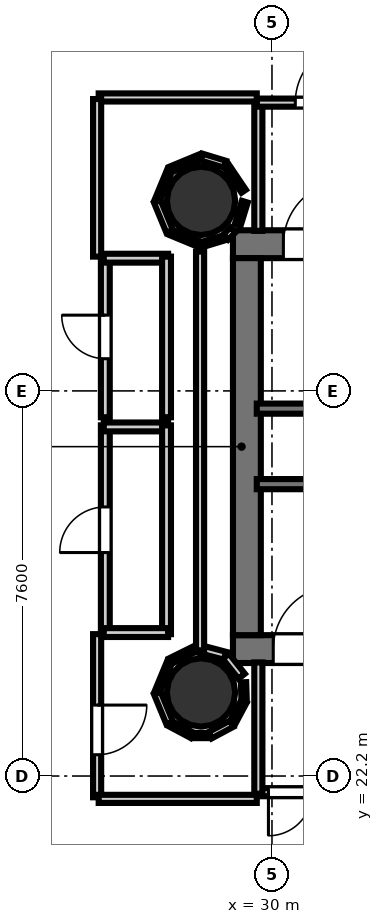
"""IFC4 building model, lengths in metres.
Left out: names, types, materials, properties, quantities, classifications, styles, units other than length and angle.
Written with IfcOpenShell. Run it as: python <this file> out.ifc"""

import sys

from ifc_helpers import new_model, si_unit, direction, frame, frame_2d, origin, origin_2d, place, context, subcontext, project, spatial, rectangle, hollow_circle, extrude, element, fill, save


model = new_model("IFC4")
c1 = context("Model", 3, precision=1e-05, world=origin(), true_north=direction((0.0, 1.0)))
c2 = subcontext(c1, "Body", "Model", "MODEL_VIEW")
j1 = project(units=[si_unit("LENGTHUNIT", "METRE"), si_unit("PLANEANGLEUNIT", "RADIAN")], contexts=[c1])
p1 = place(None, origin())
s1 = spatial("IfcSite", under=j1, at=p1, CompositionType="ELEMENT")
p2 = place(p1, origin())
s2 = spatial("IfcBuilding", under=s1, at=p2, CompositionType="ELEMENT")
p3 = place(p2, frame((0.0, 0.0, 151.3)))
s3 = spatial("IfcBuildingStorey", under=s2, at=p3, CompositionType="ELEMENT", Elevation=151.3)
p4 = place(p3, frame((29.23, 32.695, 0.0), z_axis=(0.0, 0.0, 1.0), x_axis=(1.0, 0.0, 0.0)))
e1 = element("IfcWall", 1, at=p4, inside=s3, PredefinedType="SHEAR", context=c2, shape_type="SweptSolid", body=[
    extrude(rectangle(XDim=10.62, YDim=0.55, at=frame_2d((5.31, 0.0))), origin(), (0.0, 0.0, 1.0), 3.52),
])
p5 = place(p4, frame((0.995, 0.0, 0.0)))
e2 = element("IfcOpeningElement", 2, at=p5, cuts=e1, PredefinedType="OPENING", context=c2, shape_type="SweptSolid", body=[
    extrude(rectangle(XDim=1.25, YDim=2.15, at=frame_2d((0.625, 1.075))), frame((0.0, 0.285, 0.0), z_axis=(0.0, -1.0, 0.0), x_axis=(1.0, 0.0, 0.0)), (0.0, 0.0, 1.0), 0.57),
])
p6 = place(p3, frame((29.23, 24.705, 0.0), z_axis=(0.0, 0.0, 1.0), x_axis=(1.0, 0.0, 0.0)))
e3 = element("IfcWall", 3, at=p6, inside=s3, PredefinedType="SHEAR", context=c2, shape_type="SweptSolid", body=[
    extrude(rectangle(XDim=10.62, YDim=0.55, at=frame_2d((5.31, 0.0))), origin(), (0.0, 0.0, 1.0), 3.52),
])
p7 = place(p6, frame((0.795, 0.0, 0.0)))
e4 = element("IfcOpeningElement", 4, at=p7, cuts=e3, PredefinedType="OPENING", context=c2, shape_type="SweptSolid", body=[
    extrude(rectangle(XDim=1.25, YDim=2.15, at=frame_2d((0.625, 1.075))), frame((0.0, 0.285, 0.0), z_axis=(0.0, -1.0, 0.0), x_axis=(1.0, 0.0, 0.0)), (0.0, 0.0, 1.0), 0.57),
])
p8 = place(p3, frame((29.505, 24.98, 0.0), z_axis=(0.0, 0.0, 1.0), x_axis=(0.0, 1.0, 0.0)))
e5 = element("IfcWall", 5, at=p8, inside=s3, PredefinedType="SHEAR", context=c2, shape_type="SweptSolid", body=[
    extrude(rectangle(XDim=7.44, YDim=0.55, at=frame_2d((3.72, 0.0))), origin(), (0.0, 0.0, 1.0), 3.52),
])
for number, where, z_axis, x_axis in (
    (6, (28.6, 33.55, 0.0), (0.0, 0.0, 1.0), (1.0, 0.0, 0.0)),
    (7, (28.6, 23.85, 0.0), (0.0, 0.0, 1.0), (1.0, 0.0, 0.0)),
):
    element("IfcColumn", number, at=place(p3, frame(where, z_axis=z_axis, x_axis=x_axis)), inside=s3, PredefinedType="COLUMN", context=c2, shape_type="SweptSolid", body=[
        extrude(hollow_circle(Radius=0.675, WallThickness=0.032, at=origin_2d()), origin(), (0.0, 0.0, 1.0), 3.7),
    ])
p9 = place(p3, frame((29.7, 29.45, 0.0), z_axis=(0.0, 0.0, 1.0), x_axis=(1.0, 0.0, 0.0)))
e8 = element("IfcWall", 8, at=p9, inside=s3, PredefinedType="SOLIDWALL", context=c2, shape_type="SweptSolid", body=[
    extrude(rectangle(XDim=8.3, YDim=0.2, at=frame_2d((4.15, 0.0))), origin(), (0.0, 0.0, 1.0), 3.52),
])
p10 = place(p3, frame((29.7, 27.96, 0.0), z_axis=(0.0, 0.0, 1.0), x_axis=(1.0, 0.0, 0.0)))
e9 = element("IfcWall", 9, at=p10, inside=s3, PredefinedType="SOLIDWALL", context=c2, shape_type="SweptSolid", body=[
    extrude(rectangle(XDim=7.75, YDim=0.2, at=frame_2d((3.875, 0.0))), origin(), (0.0, 0.0, 1.0), 3.52),
])
p11 = place(p3, frame((29.731, 32.958, 0.0), z_axis=(0.0, 0.0, 1.0), x_axis=(0.0, 1.0, 0.0)))
e10 = element("IfcWall", 10, at=p11, inside=s3, PredefinedType="PARTITIONING", context=c2, shape_type="SweptSolid", body=[
    extrude(rectangle(XDim=2.562, YDim=0.16, at=frame_2d((1.281, 0.0))), origin(), (0.0, 0.0, 1.0), 2.84),
])
p12 = place(p3, frame((29.7, 35.489, 0.0), z_axis=(0.0, 0.0, 1.0), x_axis=(1.0, 0.0, 0.0)))
e11 = element("IfcWall", 11, at=p12, inside=s3, PredefinedType="PARTITIONING", context=c2, shape_type="SweptSolid", body=[
    extrude(rectangle(XDim=2.72, YDim=0.16, at=frame_2d((1.36, 0.0))), origin(), (0.0, 0.0, 1.0), 2.84),
])
p13 = place(p12, frame((0.76, 0.0, 0.0)))
e12 = element("IfcOpeningElement", 12, at=p13, cuts=e11, PredefinedType="OPENING", context=c2, shape_type="SweptSolid", body=[
    extrude(rectangle(XDim=1.2, YDim=2.15, at=frame_2d((0.6, 1.075))), frame((0.0, 0.09, 0.0), z_axis=(0.0, -1.0, 0.0), x_axis=(1.0, 0.0, 0.0)), (0.0, 0.0, 1.0), 0.18),
])
p14 = place(p3, frame((33.45, 21.881, 0.0), z_axis=(0.0, 0.0, 1.0), x_axis=(-1.0, 0.0, 0.0)))
e13 = element("IfcWall", 13, at=p14, inside=s3, PredefinedType="PARTITIONING", context=c2, shape_type="SweptSolid", body=[
    extrude(rectangle(XDim=3.75, YDim=0.16, at=frame_2d((1.875, 0.0))), origin(), (0.0, 0.0, 1.0), 2.84),
])
p15 = place(p14, frame((1.275, 0.0, 0.0)))
e14 = element("IfcOpeningElement", 14, at=p15, cuts=e13, PredefinedType="OPENING", context=c2, shape_type="SweptSolid", body=[
    extrude(rectangle(XDim=1.2, YDim=2.15, at=frame_2d((0.6, 1.075))), frame((0.0, 0.09, 0.0), z_axis=(0.0, -1.0, 0.0), x_axis=(1.0, 0.0, 0.0)), (0.0, 0.0, 1.0), 0.18),
])
p16 = place(p14, frame((2.66, 0.0, 0.0)))
e15 = element("IfcOpeningElement", 15, at=p16, cuts=e13, PredefinedType="OPENING", context=c2, shape_type="SweptSolid", body=[
    extrude(rectangle(XDim=0.86, YDim=2.05, at=frame_2d((0.43, 1.025))), frame((0.0, 0.09, 0.0), z_axis=(0.0, -1.0, 0.0), x_axis=(1.0, 0.0, 0.0)), (0.0, 0.0, 1.0), 0.18),
])
p17 = place(p3, frame((29.731, 21.85, 0.0), z_axis=(0.0, 0.0, 1.0), x_axis=(0.0, 1.0, 0.0)))
e16 = element("IfcWall", 16, at=p17, inside=s3, PredefinedType="PARTITIONING", context=c2, shape_type="SweptSolid", body=[
    extrude(rectangle(XDim=2.592, YDim=0.16, at=frame_2d((1.296, 0.0))), origin(), (0.0, 0.0, 1.0), 2.84),
])
p18 = place(p3, frame((26.711, 25.0, 0.0), z_axis=(0.0, 0.0, 1.0), x_axis=(0.0, 1.0, 0.0)))
e17 = element("IfcWall", 17, at=p18, inside=s3, PredefinedType="PLUMBINGWALL", context=c2, shape_type="SweptSolid", body=[
    extrude(rectangle(XDim=4.12, YDim=0.175, at=frame_2d((2.06, 0.0))), origin(), (0.0, 0.0, 1.0), 2.84),
])
p19 = place(p18, frame((1.61, 0.0, 0.0)))
e18 = element("IfcOpeningElement", 18, at=p19, cuts=e17, PredefinedType="OPENING", context=c2, shape_type="SweptSolid", body=[
    extrude(rectangle(XDim=0.9, YDim=2.1, at=frame_2d((0.45, 1.05))), frame((0.0, 0.097, 0.0), z_axis=(0.0, -1.0, 0.0), x_axis=(1.0, 0.0, 0.0)), (0.0, 0.0, 1.0), 0.195),
])
p20 = place(p3, frame((26.68, 29.089, 0.0), z_axis=(0.0, 0.0, 1.0), x_axis=(1.0, 0.0, 0.0)))
e19 = element("IfcWall", 19, at=p20, inside=s3, PredefinedType="PLUMBINGWALL", context=c2, shape_type="SweptSolid", body=[
    extrude(rectangle(XDim=1.27, YDim=0.175, at=frame_2d((0.635, 0.0))), origin(), (0.0, 0.0, 1.0), 2.84),
])
p21 = place(p3, frame((27.919, 29.12, 0.0), z_axis=(0.0, 0.0, 1.0), x_axis=(0.0, -1.0, 0.0)))
e20 = element("IfcWall", 20, at=p21, inside=s3, PredefinedType="PLUMBINGWALL", context=c2, shape_type="SweptSolid", body=[
    extrude(rectangle(XDim=4.12, YDim=0.175, at=frame_2d((2.06, 0.0))), origin(), (0.0, 0.0, 1.0), 2.84),
])
p22 = place(p3, frame((27.95, 25.031, 0.0), z_axis=(0.0, 0.0, 1.0), x_axis=(-1.0, 0.0, 0.0)))
e21 = element("IfcWall", 21, at=p22, inside=s3, PredefinedType="PLUMBINGWALL", context=c2, shape_type="SweptSolid", body=[
    extrude(rectangle(XDim=1.27, YDim=0.175, at=frame_2d((0.635, 0.0))), origin(), (0.0, 0.0, 1.0), 2.84),
])
p23 = place(p3, frame((26.711, 29.28, 0.0), z_axis=(0.0, 0.0, 1.0), x_axis=(0.0, 1.0, 0.0)))
e22 = element("IfcWall", 22, at=p23, inside=s3, PredefinedType="PLUMBINGWALL", context=c2, shape_type="SweptSolid", body=[
    extrude(rectangle(XDim=3.17, YDim=0.175, at=frame_2d((1.585, 0.0))), origin(), (0.0, 0.0, 1.0), 2.84),
])
p24 = place(p23, frame((1.155, 0.0, 0.0)))
e23 = element("IfcOpeningElement", 23, at=p24, cuts=e22, PredefinedType="OPENING", context=c2, shape_type="SweptSolid", body=[
    extrude(rectangle(XDim=0.86, YDim=2.05, at=frame_2d((0.43, 1.025))), frame((0.0, 0.097, 0.0), z_axis=(0.0, -1.0, 0.0), x_axis=(1.0, 0.0, 0.0)), (0.0, 0.0, 1.0), 0.195),
])
p25 = place(p3, frame((26.68, 32.419, 0.0), z_axis=(0.0, 0.0, 1.0), x_axis=(1.0, 0.0, 0.0)))
e24 = element("IfcWall", 24, at=p25, inside=s3, PredefinedType="PLUMBINGWALL", context=c2, shape_type="SweptSolid", body=[
    extrude(rectangle(XDim=1.27, YDim=0.175, at=frame_2d((0.635, 0.0))), origin(), (0.0, 0.0, 1.0), 2.84),
])
p26 = place(p3, frame((27.919, 32.45, 0.0), z_axis=(0.0, 0.0, 1.0), x_axis=(0.0, -1.0, 0.0)))
e25 = element("IfcWall", 25, at=p26, inside=s3, PredefinedType="PLUMBINGWALL", context=c2, shape_type="SweptSolid", body=[
    extrude(rectangle(XDim=3.17, YDim=0.175, at=frame_2d((1.585, 0.0))), origin(), (0.0, 0.0, 1.0), 2.84),
])
p27 = place(p3, frame((29.402, 24.169, 0.0), z_axis=(0.0, 0.0, 1.0), x_axis=(-0.622091855036, 0.782944266151, 0.0)))
e26 = element("IfcWall", 26, at=p27, inside=s3, PredefinedType="PARTITIONING", context=c2, shape_type="SweptSolid", body=[
    extrude(rectangle(XDim=0.504, YDim=0.16, at=frame_2d((0.252, 0.0))), origin(), (0.0, 0.0, 1.0), 2.84),
])
p28 = place(p3, frame((29.072, 24.574, 0.0), z_axis=(0.0, 0.0, 1.0), x_axis=(-0.966842101769, 0.255374920942, 0.0)))
e27 = element("IfcWall", 27, at=p28, inside=s3, PredefinedType="PARTITIONING", context=c2, shape_type="SweptSolid", body=[
    extrude(rectangle(XDim=0.531, YDim=0.16, at=frame_2d((0.266, 0.0))), origin(), (0.0, 0.0, 1.0), 2.84),
])
p29 = place(p3, frame((28.581, 24.68, 0.0), z_axis=(0.0, 0.0, 1.0), x_axis=(0.0, 1.0, 0.0)))
e28 = element("IfcWall", 28, at=p29, inside=s3, PredefinedType="PARTITIONING", context=c2, shape_type="SweptSolid", body=[
    extrude(rectangle(XDim=7.87, YDim=0.16, at=frame_2d((3.935, 0.0))), origin(), (0.0, 0.0, 1.0), 2.84),
])
p30 = place(p3, frame((29.7, 35.591, 0.0), z_axis=(0.0, 0.0, 1.0), x_axis=(-1.0, 0.0, 0.0)))
e29 = element("IfcWall", 29, at=p30, inside=s3, PredefinedType="PARTITIONING", context=c2, shape_type="SweptSolid", body=[
    extrude(rectangle(XDim=3.12, YDim=0.16, at=frame_2d((1.56, 0.0))), origin(), (0.0, 0.0, 1.0), 2.84),
])
p31 = place(p3, frame((26.549, 35.56, 0.0), z_axis=(0.0, 0.0, 1.0), x_axis=(0.0, -1.0, 0.0)))
e30 = element("IfcWall", 30, at=p31, inside=s3, PredefinedType="PARTITIONING", context=c2, shape_type="SweptSolid", body=[
    extrude(rectangle(XDim=3.11, YDim=0.16, at=frame_2d((1.555, 0.0))), origin(), (0.0, 0.0, 1.0), 2.84),
])
p32 = place(p3, frame((26.549, 25.0, 0.0), z_axis=(0.0, 0.0, 1.0), x_axis=(0.0, -1.0, 0.0)))
e31 = element("IfcWall", 31, at=p32, inside=s3, PredefinedType="PARTITIONING", context=c2, shape_type="SweptSolid", body=[
    extrude(rectangle(XDim=3.22, YDim=0.16, at=frame_2d((1.61, 0.0))), origin(), (0.0, 0.0, 1.0), 2.84),
])
p33 = place(p32, frame((1.4, 0.0, 0.0)))
e32 = element("IfcOpeningElement", 32, at=p33, cuts=e31, PredefinedType="OPENING", context=c2, shape_type="SweptSolid", body=[
    extrude(rectangle(XDim=0.98, YDim=2.1, at=frame_2d((0.49, 1.05))), frame((0.0, 0.09, 0.0), z_axis=(0.0, -1.0, 0.0), x_axis=(1.0, 0.0, 0.0)), (0.0, 0.0, 1.0), 0.18),
])
p34 = place(p3, frame((26.58, 21.749, 0.0), z_axis=(0.0, 0.0, 1.0), x_axis=(1.0, 0.0, 0.0)))
e33 = element("IfcWall", 33, at=p34, inside=s3, PredefinedType="PARTITIONING", context=c2, shape_type="SweptSolid", body=[
    extrude(rectangle(XDim=3.12, YDim=0.16, at=frame_2d((1.56, 0.0))), origin(), (0.0, 0.0, 1.0), 2.84),
])
p35 = place(p3, frame((29.441, 33.741, 0.0), z_axis=(0.0, 0.0, 1.0), x_axis=(-0.559619584068, 0.828749613048, 0.0)))
e34 = element("IfcWall", 34, at=p35, inside=s3, PredefinedType="PARTITIONING", context=c2, shape_type="SweptSolid", body=[
    extrude(rectangle(XDim=0.629, YDim=0.105, at=frame_2d((0.314, 0.0))), origin(), (0.0, 0.0, 1.0), 2.84),
])
p36 = place(p3, frame((29.073, 34.274, 0.0), z_axis=(0.0, 0.0, 1.0), x_axis=(-0.956893067978, 0.290440452511, 0.0)))
e35 = element("IfcWall", 35, at=p36, inside=s3, PredefinedType="PARTITIONING", context=c2, shape_type="SweptSolid", body=[
    extrude(rectangle(XDim=0.485, YDim=0.14, at=frame_2d((0.243, 0.0))), origin(), (0.0, 0.0, 1.0), 2.84),
])
p37 = place(p3, frame((28.588, 34.414, 0.0), z_axis=(0.0, 0.0, 1.0), x_axis=(-0.923956302996, -0.382498039412, 0.0)))
e36 = element("IfcWall", 36, at=p37, inside=s3, PredefinedType="PARTITIONING", context=c2, shape_type="SweptSolid", body=[
    extrude(rectangle(XDim=0.639, YDim=0.12, at=frame_2d((0.319, 0.0))), origin(), (0.0, 0.0, 1.0), 2.84),
])
p38 = place(p3, frame((27.981, 34.152, 0.0), z_axis=(0.0, 0.0, 1.0), x_axis=(-0.382824178437, -0.923821221018, 0.0)))
e37 = element("IfcWall", 37, at=p38, inside=s3, PredefinedType="PARTITIONING", context=c2, shape_type="SweptSolid", body=[
    extrude(rectangle(XDim=0.639, YDim=0.105, at=frame_2d((0.319, 0.0))), origin(), (0.0, 0.0, 1.0), 2.84),
])
p39 = place(p3, frame((27.736, 33.538, 0.0), z_axis=(0.0, 0.0, 1.0), x_axis=(0.382824178437, -0.923821221018, 0.0)))
e38 = element("IfcWall", 38, at=p39, inside=s3, PredefinedType="PARTITIONING", context=c2, shape_type="SweptSolid", body=[
    extrude(rectangle(XDim=0.639, YDim=0.14, at=frame_2d((0.319, 0.0))), origin(), (0.0, 0.0, 1.0), 2.84),
])
p40 = place(p3, frame((27.998, 32.931, 0.0), z_axis=(0.0, 0.0, 1.0), x_axis=(0.923821221018, -0.382824178437, 0.0)))
e39 = element("IfcWall", 39, at=p40, inside=s3, PredefinedType="PARTITIONING", context=c2, shape_type="SweptSolid", body=[
    extrude(rectangle(XDim=0.639, YDim=0.12, at=frame_2d((0.319, 0.0))), origin(), (0.0, 0.0, 1.0), 2.84),
])
p41 = place(p3, frame((28.609, 32.685, 0.0), z_axis=(0.0, 0.0, 1.0), x_axis=(0.956893067978, 0.290440452511, 0.0)))
e40 = element("IfcWall", 40, at=p41, inside=s3, PredefinedType="PARTITIONING", context=c2, shape_type="SweptSolid", body=[
    extrude(rectangle(XDim=0.485, YDim=0.105, at=frame_2d((0.243, 0.0))), origin(), (0.0, 0.0, 1.0), 2.84),
])
p42 = place(p3, frame((29.086, 32.834, 0.0), z_axis=(0.0, 0.0, 1.0), x_axis=(0.707106781187, 0.707106781187, 0.0)))
e41 = element("IfcWall", 41, at=p42, inside=s3, PredefinedType="PARTITIONING", context=c2, shape_type="SweptSolid", body=[
    extrude(rectangle(XDim=0.204, YDim=0.14, at=frame_2d((0.102, 0.0))), origin(), (0.0, 0.0, 1.0), 2.84),
])
p43 = place(p3, frame((29.324, 33.077, 0.0), z_axis=(0.0, 0.0, 1.0), x_axis=(0.292866596221, 0.956153312402, 0.0)))
e42 = element("IfcWall", 42, at=p43, inside=s3, PredefinedType="PARTITIONING", context=c2, shape_type="SweptSolid", body=[
    extrude(rectangle(XDim=0.479, YDim=0.12, at=frame_2d((0.239, 0.0))), origin(), (0.0, 0.0, 1.0), 2.84),
])
p44 = place(p3, frame((28.466, 24.701, 0.0), z_axis=(0.0, 0.0, 1.0), x_axis=(-0.896372347763, -0.44330194469, 0.0)))
e43 = element("IfcWall", 43, at=p44, inside=s3, PredefinedType="PARTITIONING", context=c2, shape_type="SweptSolid", body=[
    extrude(rectangle(XDim=0.525, YDim=0.12, at=frame_2d((0.262, 0.0))), origin(), (0.0, 0.0, 1.0), 2.84),
])
p45 = place(p3, frame((27.981, 24.452, 0.0), z_axis=(0.0, 0.0, 1.0), x_axis=(-0.38268910224, -0.923877183952, 0.0)))
e44 = element("IfcWall", 44, at=p45, inside=s3, PredefinedType="PARTITIONING", context=c2, shape_type="SweptSolid", body=[
    extrude(rectangle(XDim=0.639, YDim=0.105, at=frame_2d((0.32, 0.0))), origin(), (0.0, 0.0, 1.0), 2.84),
])
p46 = place(p3, frame((27.736, 23.838, 0.0), z_axis=(0.0, 0.0, 1.0), x_axis=(0.382824178437, -0.923821221018, 0.0)))
e45 = element("IfcWall", 45, at=p46, inside=s3, PredefinedType="PARTITIONING", context=c2, shape_type="SweptSolid", body=[
    extrude(rectangle(XDim=0.639, YDim=0.14, at=frame_2d((0.319, 0.0))), origin(), (0.0, 0.0, 1.0), 2.84),
])
p47 = place(p3, frame((27.995, 23.232, 0.0), z_axis=(0.0, 0.0, 1.0), x_axis=(0.88190639713, -0.471424550379, 0.0)))
e46 = element("IfcWall", 46, at=p47, inside=s3, PredefinedType="PARTITIONING", context=c2, shape_type="SweptSolid", body=[
    extrude(rectangle(XDim=0.485, YDim=0.12, at=frame_2d((0.242, 0.0))), origin(), (0.0, 0.0, 1.0), 2.84),
])
p48 = place(p3, frame((28.437, 23.0, 0.0), z_axis=(0.0, 0.0, 1.0), x_axis=(1.0, 0.0, 0.0)))
e47 = element("IfcWall", 47, at=p48, inside=s3, PredefinedType="PARTITIONING", context=c2, shape_type="SweptSolid", body=[
    extrude(rectangle(XDim=0.326, YDim=0.105, at=frame_2d((0.163, 0.0))), origin(), (0.0, 0.0, 1.0), 2.84),
])
p49 = place(p3, frame((28.778, 23.004, 0.0), z_axis=(0.0, 0.0, 1.0), x_axis=(0.88190639713, 0.471424550379, 0.0)))
e48 = element("IfcWall", 48, at=p49, inside=s3, PredefinedType="PARTITIONING", context=c2, shape_type="SweptSolid", body=[
    extrude(rectangle(XDim=0.485, YDim=0.14, at=frame_2d((0.242, 0.0))), origin(), (0.0, 0.0, 1.0), 2.84),
])
p50 = place(p3, frame((29.218, 23.245, 0.0), z_axis=(0.0, 0.0, 1.0), x_axis=(0.471424550379, 0.88190639713, 0.0)))
e49 = element("IfcWall", 49, at=p50, inside=s3, PredefinedType="PARTITIONING", context=c2, shape_type="SweptSolid", body=[
    extrude(rectangle(XDim=0.485, YDim=0.12, at=frame_2d((0.242, 0.0))), origin(), (0.0, 0.0, 1.0), 2.84),
])
p51 = place(p3, frame((29.45, 23.688, 0.0), z_axis=(0.0, 0.0, 1.0), x_axis=(-0.030919976938, 0.999521863206, 0.0)))
e50 = element("IfcWall", 50, at=p51, inside=s3, PredefinedType="PARTITIONING", context=c2, shape_type="SweptSolid", body=[
    extrude(rectangle(XDim=0.363, YDim=0.105, at=frame_2d((0.182, 0.0))), origin(), (0.0, 0.0, 1.0), 2.84),
])
p52 = place(p5, origin())
e51 = element("IfcDoor", 51, at=p52, inside=s3, OperationType="SINGLE_SWING_RIGHT", PredefinedType="DOOR", context=c2, shape_type="SweptSolid", body=[
    extrude(rectangle(XDim=1.25, YDim=2.15, at=frame_2d((0.625, 1.075))), frame((0.0, 0.025, 0.0), z_axis=(0.0, -1.0, 0.0), x_axis=(1.0, 0.0, 0.0)), (0.0, 0.0, 1.0), 0.05),
])
fill(e2, e51)
p53 = place(p7, origin())
e52 = element("IfcDoor", 52, at=p53, inside=s3, OperationType="SINGLE_SWING_RIGHT", PredefinedType="DOOR", context=c2, shape_type="SweptSolid", body=[
    extrude(rectangle(XDim=1.25, YDim=2.15, at=frame_2d((0.625, 1.075))), frame((0.0, 0.025, 0.0), z_axis=(0.0, -1.0, 0.0), x_axis=(1.0, 0.0, 0.0)), (0.0, 0.0, 1.0), 0.05),
])
fill(e4, e52)
p54 = place(p13, origin())
e53 = element("IfcDoor", 53, at=p54, inside=s3, OperationType="SINGLE_SWING_RIGHT", PredefinedType="DOOR", context=c2, shape_type="SweptSolid", body=[
    extrude(rectangle(XDim=1.2, YDim=2.15, at=frame_2d((0.6, 1.075))), frame((0.0, 0.025, 0.0), z_axis=(0.0, -1.0, 0.0), x_axis=(1.0, 0.0, 0.0)), (0.0, 0.0, 1.0), 0.05),
])
fill(e12, e53)
p55 = place(p19, origin())
e54 = element("IfcDoor", 54, at=p55, inside=s3, OperationType="SINGLE_SWING_LEFT", PredefinedType="DOOR", context=c2, shape_type="SweptSolid", body=[
    extrude(rectangle(XDim=0.9, YDim=2.1, at=frame_2d((0.45, 1.05))), frame((0.0, 0.025, 0.0), z_axis=(0.0, -1.0, 0.0), x_axis=(1.0, 0.0, 0.0)), (0.0, 0.0, 1.0), 0.05),
])
fill(e18, e54)
p56 = place(p24, origin())
e55 = element("IfcDoor", 55, at=p56, inside=s3, OperationType="SINGLE_SWING_RIGHT", PredefinedType="DOOR", context=c2, shape_type="SweptSolid", body=[
    extrude(rectangle(XDim=0.86, YDim=2.05, at=frame_2d((0.43, 1.025))), frame((0.0, 0.025, 0.0), z_axis=(0.0, -1.0, 0.0), x_axis=(1.0, 0.0, 0.0)), (0.0, 0.0, 1.0), 0.05),
])
fill(e23, e55)
p57 = place(p16, origin())
e56 = element("IfcDoor", 56, at=p57, inside=s3, OperationType="SINGLE_SWING_RIGHT", PredefinedType="DOOR", context=c2, shape_type="SweptSolid", body=[
    extrude(rectangle(XDim=0.86, YDim=2.05, at=frame_2d((0.43, 1.025))), frame((0.0, 0.025, 0.0), z_axis=(0.0, -1.0, 0.0), x_axis=(1.0, 0.0, 0.0)), (0.0, 0.0, 1.0), 0.05),
])
fill(e15, e56)
p58 = place(p33, origin())
e57 = element("IfcDoor", 57, at=p58, inside=s3, OperationType="SINGLE_SWING_LEFT", PredefinedType="DOOR", context=c2, shape_type="SweptSolid", body=[
    extrude(rectangle(XDim=0.98, YDim=2.1, at=frame_2d((0.49, 1.05))), frame((0.0, 0.025, 0.0), z_axis=(0.0, -1.0, 0.0), x_axis=(1.0, 0.0, 0.0)), (0.0, 0.0, 1.0), 0.05),
])
fill(e32, e57)
save(model, sys.argv[1])
